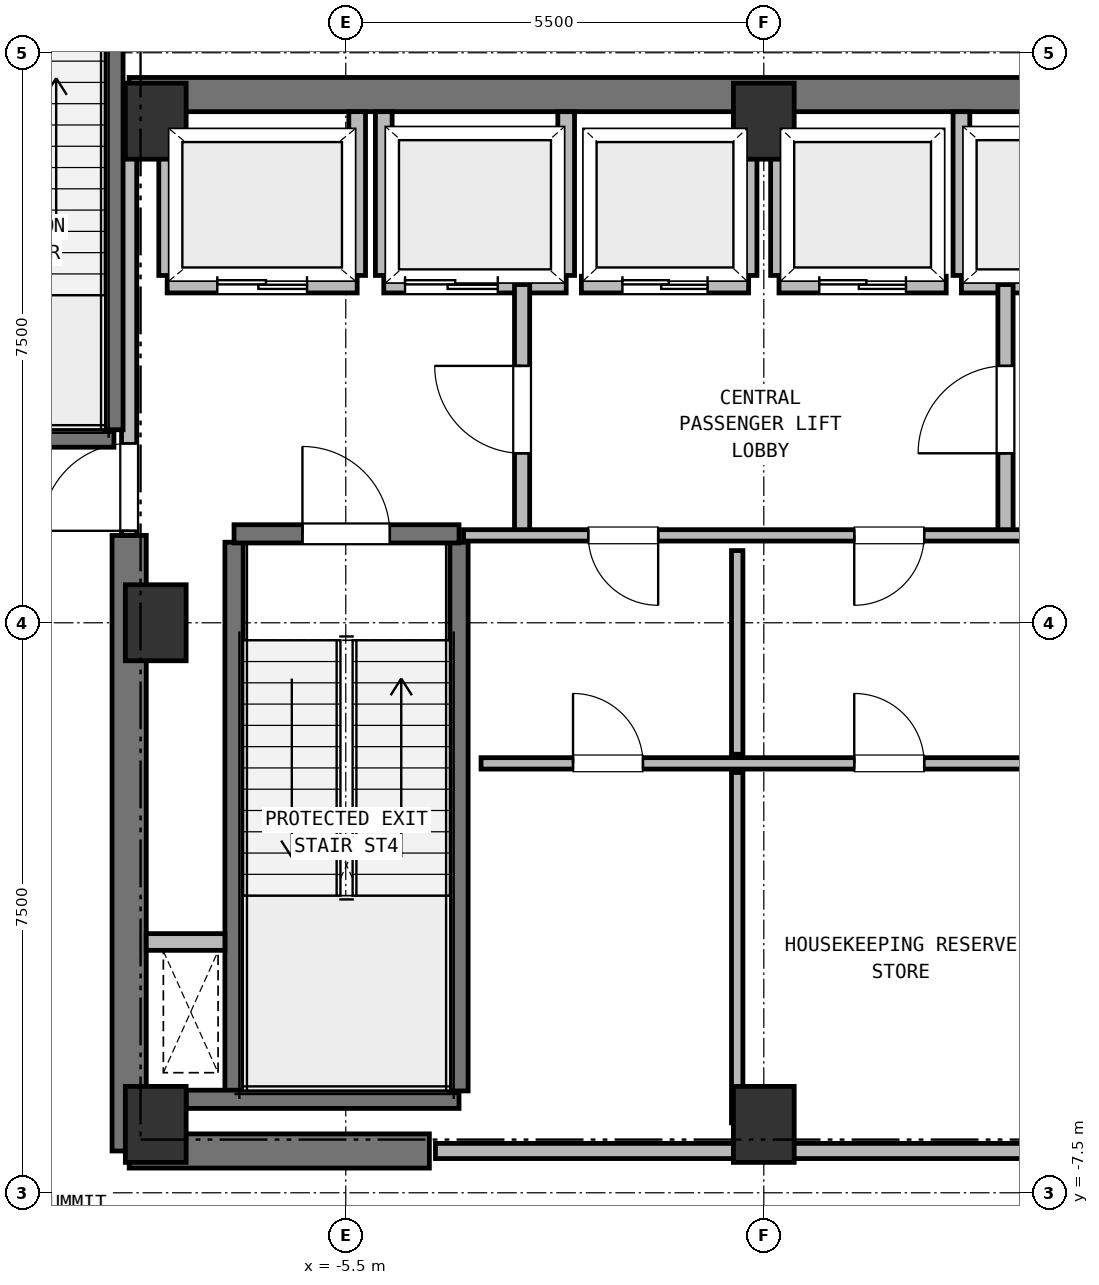
"""IFC4 building model, lengths in metres.
Left out: names, types, materials, properties, quantities, classifications, styles, units other than length and angle.
Written with IfcOpenShell. Run it as: python <this file> out.ifc"""

import sys

from ifc_helpers import new_model, si_unit, direction, frame, frame_2d, origin, origin_2d, place, context, subcontext, project, spatial, rectangle, extrude, element, fill, save


model = new_model("IFC4")
c1 = context("Model", 3, precision=1e-05, world=origin(), true_north=direction((0.0, 1.0)))
c2 = subcontext(c1, "Body", "Model", "MODEL_VIEW")
j1 = project(units=[si_unit("LENGTHUNIT", "METRE"), si_unit("PLANEANGLEUNIT", "RADIAN")], contexts=[c1])
p1 = place(None, origin())
s1 = spatial("IfcSite", under=j1, at=p1, CompositionType="ELEMENT")
p2 = place(p1, origin())
s2 = spatial("IfcBuilding", under=s1, at=p2, CompositionType="ELEMENT")
p3 = place(p2, frame((0.0, 0.0, 286.0)))
s3 = spatial("IfcBuildingStorey", under=s2, at=p3, CompositionType="ELEMENT", Elevation=286.0)
for number, where, z_axis, x_axis in (
    (1, (-8.0, -6.6, 0.0), (0.0, 0.0, 1.0), (1.0, 0.0, 0.0)),
    (2, (0.0, -6.6, 0.0), (0.0, 0.0, 1.0), (1.0, 0.0, 0.0)),
    (3, (0.0, 6.6, 0.0), (0.0, 0.0, 1.0), (1.0, 0.0, 0.0)),
    (4, (-8.0, 6.6, 0.0), (0.0, 0.0, 1.0), (1.0, 0.0, 0.0)),
    (5, (-8.0, 0.0, 0.0), (0.0, 0.0, 1.0), (1.0, 0.0, 0.0)),
):
    element("IfcColumn", number, at=place(p3, frame(where, z_axis=z_axis, x_axis=x_axis)), inside=s3, PredefinedType="COLUMN", context=c2, shape_type="SweptSolid", body=[
        extrude(rectangle(XDim=0.8, YDim=1.0, at=origin_2d()), origin(), (0.0, 0.0, 1.0), 4.4),
    ])
p4 = place(p3, frame((-8.35, 6.95, 0.0), z_axis=(0.0, 0.0, 1.0), x_axis=(1.0, 0.0, 0.0)))
e6 = element("IfcWall", 6, at=p4, inside=s3, PredefinedType="SHEAR", context=c2, shape_type="SweptSolid", body=[
    extrude(rectangle(XDim=16.7, YDim=0.45, at=frame_2d((8.35, 0.0))), origin(), (0.0, 0.0, 1.0), 4.13),
])
p5 = place(p3, frame((-8.35, -6.95, 0.0), z_axis=(0.0, 0.0, 1.0), x_axis=(1.0, 0.0, 0.0)))
e7 = element("IfcWall", 7, at=p5, inside=s3, PredefinedType="SHEAR", context=c2, shape_type="SweptSolid", body=[
    extrude(rectangle(XDim=3.95, YDim=0.45, at=frame_2d((1.975, 0.0))), origin(), (0.0, 0.0, 1.0), 4.13),
])
p6 = place(p3, frame((-8.35, -6.95, 0.0), z_axis=(0.0, 0.0, 1.0), x_axis=(0.0, 1.0, 0.0)))
e8 = element("IfcWall", 8, at=p6, inside=s3, PredefinedType="SHEAR", context=c2, shape_type="SweptSolid", body=[
    extrude(rectangle(XDim=8.1, YDim=0.45, at=frame_2d((4.05, 0.0))), origin(), (0.0, 0.0, 1.0), 4.13),
])
p7 = place(p3, frame((-6.97, -6.16, 0.0), z_axis=(0.0, 0.0, 1.0), x_axis=(0.0, 1.0, 0.0)))
e9 = element("IfcWall", 9, at=p7, inside=s3, PredefinedType="SHEAR", context=c2, shape_type="SweptSolid", body=[
    extrude(rectangle(XDim=7.22, YDim=0.24, at=frame_2d((3.61, 0.0))), origin(), (0.0, 0.0, 1.0), 4.13),
])
p8 = place(p3, frame((-7.6, -6.27, 0.0), z_axis=(0.0, 0.0, 1.0), x_axis=(1.0, 0.0, 0.0)))
e10 = element("IfcWall", 10, at=p8, inside=s3, PredefinedType="SHEAR", context=c2, shape_type="SweptSolid", body=[
    extrude(rectangle(XDim=3.59, YDim=0.24, at=frame_2d((1.795, 0.0))), origin(), (0.0, 0.0, 1.0), 4.13),
])
p9 = place(p3, frame((-4.01, -6.16, 0.0), z_axis=(0.0, 0.0, 1.0), x_axis=(0.0, 1.0, 0.0)))
e11 = element("IfcWall", 11, at=p9, inside=s3, PredefinedType="SHEAR", context=c2, shape_type="SweptSolid", body=[
    extrude(rectangle(XDim=7.22, YDim=0.24, at=frame_2d((3.61, 0.0))), origin(), (0.0, 0.0, 1.0), 4.13),
])
p10 = place(p3, frame((-6.97, 1.17, 0.0), z_axis=(0.0, 0.0, 1.0), x_axis=(1.0, 0.0, 0.0)))
e12 = element("IfcWall", 12, at=p10, inside=s3, PredefinedType="SHEAR", context=c2, shape_type="SweptSolid", body=[
    extrude(rectangle(XDim=2.96, YDim=0.24, at=frame_2d((1.48, 0.0))), origin(), (0.0, 0.0, 1.0), 4.13),
])
p11 = place(p10, frame((0.9, 0.0, 0.0)))
e13 = element("IfcOpeningElement", 13, at=p11, cuts=e12, PredefinedType="OPENING", context=c2, shape_type="SweptSolid", body=[
    extrude(rectangle(XDim=1.15, YDim=2.15, at=frame_2d((0.575, 1.075))), frame((0.0, 0.13, 0.0), z_axis=(0.0, -1.0, 0.0), x_axis=(1.0, 0.0, 0.0)), (0.0, 0.0, 1.0), 0.26),
])
p12 = place(p3, frame((-8.125, -4.2, 0.0), z_axis=(0.0, 0.0, 1.0), x_axis=(1.0, 0.0, 0.0)))
e14 = element("IfcWall", 14, at=p12, inside=s3, PredefinedType="PARTITIONING", context=c2, shape_type="SweptSolid", body=[
    extrude(rectangle(XDim=1.035, YDim=0.22, at=frame_2d((0.518, 0.0))), origin(), (0.0, 0.0, 1.0), 4.13),
])
p13 = place(p3, frame((-7.85, 4.45, 0.0), z_axis=(0.0, 0.0, 1.0), x_axis=(1.0, 0.0, 0.0)))
e15 = element("IfcWall", 15, at=p13, inside=s3, PredefinedType="PARTITIONING", context=c2, shape_type="SweptSolid", body=[
    extrude(rectangle(XDim=2.5, YDim=0.22, at=frame_2d((1.25, 0.0))), origin(), (0.0, 0.0, 1.0), 4.13),
])
p14 = place(p13, frame((0.66, 0.0, 0.0)))
e16 = element("IfcOpeningElement", 16, at=p14, cuts=e15, PredefinedType="OPENING", context=c2, shape_type="SweptSolid", body=[
    extrude(rectangle(XDim=1.18, YDim=2.15, at=frame_2d((0.59, 1.075))), frame((0.0, 0.12, 0.0), z_axis=(0.0, -1.0, 0.0), x_axis=(1.0, 0.0, 0.0)), (0.0, 0.0, 1.0), 0.24),
])
p15 = place(p3, frame((-7.85, 4.57, 0.0), z_axis=(0.0, 0.0, 1.0), x_axis=(0.0, 1.0, 0.0)))
e17 = element("IfcWall", 17, at=p15, inside=s3, PredefinedType="PARTITIONING", context=c2, shape_type="SweptSolid", body=[
    extrude(rectangle(XDim=2.155, YDim=0.22, at=frame_2d((1.078, 0.0))), origin(), (0.0, 0.0, 1.0), 3.81),
])
p16 = place(p3, frame((-5.35, 4.57, 0.0), z_axis=(0.0, 0.0, 1.0), x_axis=(0.0, 1.0, 0.0)))
e18 = element("IfcWall", 18, at=p16, inside=s3, PredefinedType="PARTITIONING", context=c2, shape_type="SweptSolid", body=[
    extrude(rectangle(XDim=2.155, YDim=0.22, at=frame_2d((1.078, 0.0))), origin(), (0.0, 0.0, 1.0), 4.13),
])
p17 = place(p3, frame((-5.0, 4.45, 0.0), z_axis=(0.0, 0.0, 1.0), x_axis=(1.0, 0.0, 0.0)))
e19 = element("IfcWall", 19, at=p17, inside=s3, PredefinedType="PARTITIONING", context=c2, shape_type="SweptSolid", body=[
    extrude(rectangle(XDim=2.4, YDim=0.22, at=frame_2d((1.2, 0.0))), origin(), (0.0, 0.0, 1.0), 4.13),
])
p18 = place(p17, frame((0.28, 0.0, 0.0)))
e20 = element("IfcOpeningElement", 20, at=p18, cuts=e19, PredefinedType="OPENING", context=c2, shape_type="SweptSolid", body=[
    extrude(rectangle(XDim=1.22, YDim=2.15, at=frame_2d((0.61, 1.075))), frame((0.0, 0.12, 0.0), z_axis=(0.0, -1.0, 0.0), x_axis=(1.0, 0.0, 0.0)), (0.0, 0.0, 1.0), 0.24),
])
for number, where, z_axis, x_axis in (
    (21, (-5.0, 4.57, 0.0), (0.0, 0.0, 1.0), (0.0, 1.0, 0.0)),
    (22, (-2.6, 4.57, 0.0), (0.0, 0.0, 1.0), (0.0, 1.0, 0.0)),
):
    element("IfcWall", number, at=place(p3, frame(where, z_axis=z_axis, x_axis=x_axis)), inside=s3, PredefinedType="PARTITIONING", context=c2, shape_type="SweptSolid", body=[
        extrude(rectangle(XDim=2.155, YDim=0.22, at=frame_2d((1.078, 0.0))), origin(), (0.0, 0.0, 1.0), 4.13),
    ])
p19 = place(p3, frame((2.6, 4.45, 0.0), z_axis=(0.0, 0.0, 1.0), x_axis=(1.0, 0.0, 0.0)))
e23 = element("IfcWall", 23, at=p19, inside=s3, PredefinedType="PARTITIONING", context=c2, shape_type="SweptSolid", body=[
    extrude(rectangle(XDim=2.4, YDim=0.22, at=frame_2d((1.2, 0.0))), origin(), (0.0, 0.0, 1.0), 4.13),
])
p20 = place(p19, frame((0.9, 0.0, 0.0)))
e24 = element("IfcOpeningElement", 24, at=p20, cuts=e23, PredefinedType="OPENING", context=c2, shape_type="SweptSolid", body=[
    extrude(rectangle(XDim=1.22, YDim=2.15, at=frame_2d((0.61, 1.075))), frame((0.0, 0.12, 0.0), z_axis=(0.0, -1.0, 0.0), x_axis=(1.0, 0.0, 0.0)), (0.0, 0.0, 1.0), 0.24),
])
p21 = place(p3, frame((2.6, 4.57, 0.0), z_axis=(0.0, 0.0, 1.0), x_axis=(0.0, 1.0, 0.0)))
e25 = element("IfcWall", 25, at=p21, inside=s3, PredefinedType="PARTITIONING", context=c2, shape_type="SweptSolid", body=[
    extrude(rectangle(XDim=2.155, YDim=0.22, at=frame_2d((1.078, 0.0))), origin(), (0.0, 0.0, 1.0), 4.13),
])
p22 = place(p3, frame((-2.4, 4.45, 0.0), z_axis=(0.0, 0.0, 1.0), x_axis=(1.0, 0.0, 0.0)))
e26 = element("IfcWall", 26, at=p22, inside=s3, PredefinedType="PARTITIONING", context=c2, shape_type="SweptSolid", body=[
    extrude(rectangle(XDim=2.2, YDim=0.22, at=frame_2d((1.1, 0.0))), origin(), (0.0, 0.0, 1.0), 4.13),
])
p23 = place(p22, frame((0.54, 0.0, 0.0)))
e27 = element("IfcOpeningElement", 27, at=p23, cuts=e26, PredefinedType="OPENING", context=c2, shape_type="SweptSolid", body=[
    extrude(rectangle(XDim=1.12, YDim=2.15, at=frame_2d((0.56, 1.075))), frame((0.0, 0.12, 0.0), z_axis=(0.0, -1.0, 0.0), x_axis=(1.0, 0.0, 0.0)), (0.0, 0.0, 1.0), 0.24),
])
p24 = place(p3, frame((-0.2, 4.57, 0.0), z_axis=(0.0, 0.0, 1.0), x_axis=(0.0, 1.0, 0.0)))
e28 = element("IfcWall", 28, at=p24, inside=s3, PredefinedType="PARTITIONING", context=c2, shape_type="SweptSolid", body=[
    extrude(rectangle(XDim=2.155, YDim=0.22, at=frame_2d((1.078, 0.0))), origin(), (0.0, 0.0, 1.0), 4.13),
])
p25 = place(p3, frame((0.2, 4.45, 0.0), z_axis=(0.0, 0.0, 1.0), x_axis=(1.0, 0.0, 0.0)))
e29 = element("IfcWall", 29, at=p25, inside=s3, PredefinedType="PARTITIONING", context=c2, shape_type="SweptSolid", body=[
    extrude(rectangle(XDim=2.2, YDim=0.22, at=frame_2d((1.1, 0.0))), origin(), (0.0, 0.0, 1.0), 4.13),
])
p26 = place(p25, frame((0.53, 0.0, 0.0)))
e30 = element("IfcOpeningElement", 30, at=p26, cuts=e29, PredefinedType="OPENING", context=c2, shape_type="SweptSolid", body=[
    extrude(rectangle(XDim=1.14, YDim=2.15, at=frame_2d((0.57, 1.075))), frame((0.0, 0.12, 0.0), z_axis=(0.0, -1.0, 0.0), x_axis=(1.0, 0.0, 0.0)), (0.0, 0.0, 1.0), 0.24),
])
p27 = place(p3, frame((0.2, 4.57, 0.0), z_axis=(0.0, 0.0, 1.0), x_axis=(0.0, 1.0, 0.0)))
e31 = element("IfcWall", 31, at=p27, inside=s3, PredefinedType="PARTITIONING", context=c2, shape_type="SweptSolid", body=[
    extrude(rectangle(XDim=2.155, YDim=0.22, at=frame_2d((1.078, 0.0))), origin(), (0.0, 0.0, 1.0), 4.13),
])
p28 = place(p3, frame((-3.18, 1.15, 0.0), z_axis=(0.0, 0.0, 1.0), x_axis=(0.0, 1.0, 0.0)))
e32 = element("IfcWall", 32, at=p28, inside=s3, PredefinedType="PARTITIONING", context=c2, shape_type="SweptSolid", body=[
    extrude(rectangle(XDim=3.3, YDim=0.2, at=frame_2d((1.65, 0.0))), origin(), (0.0, 0.0, 1.0), 4.13),
])
p29 = place(p28, frame((1.08, 0.0, 0.0)))
e33 = element("IfcOpeningElement", 33, at=p29, cuts=e32, PredefinedType="OPENING", context=c2, shape_type="SweptSolid", body=[
    extrude(rectangle(XDim=1.15, YDim=2.15, at=frame_2d((0.575, 1.075))), frame((0.0, 0.11, 0.0), z_axis=(0.0, -1.0, 0.0), x_axis=(1.0, 0.0, 0.0)), (0.0, 0.0, 1.0), 0.22),
])
p30 = place(p3, frame((3.18, 1.15, 0.0), z_axis=(0.0, 0.0, 1.0), x_axis=(0.0, 1.0, 0.0)))
e34 = element("IfcWall", 34, at=p30, inside=s3, PredefinedType="PARTITIONING", context=c2, shape_type="SweptSolid", body=[
    extrude(rectangle(XDim=3.3, YDim=0.2, at=frame_2d((1.65, 0.0))), origin(), (0.0, 0.0, 1.0), 4.13),
])
p31 = place(p30, frame((1.08, 0.0, 0.0)))
e35 = element("IfcOpeningElement", 35, at=p31, cuts=e34, PredefinedType="OPENING", context=c2, shape_type="SweptSolid", body=[
    extrude(rectangle(XDim=1.15, YDim=2.15, at=frame_2d((0.575, 1.075))), frame((0.0, 0.11, 0.0), z_axis=(0.0, -1.0, 0.0), x_axis=(1.0, 0.0, 0.0)), (0.0, 0.0, 1.0), 0.22),
])
p32 = place(p3, frame((-8.35, 1.15, 0.0), z_axis=(0.0, 0.0, 1.0), x_axis=(0.0, 1.0, 0.0)))
e36 = element("IfcWall", 36, at=p32, inside=s3, PredefinedType="PARTITIONING", context=c2, shape_type="SweptSolid", body=[
    extrude(rectangle(XDim=5.4, YDim=0.2, at=frame_2d((2.7, 0.0))), origin(), (0.0, 0.0, 1.0), 4.13),
])
p33 = place(p32, frame((0.06, 0.0, 0.0)))
e37 = element("IfcOpeningElement", 37, at=p33, cuts=e36, PredefinedType="OPENING", context=c2, shape_type="SweptSolid", body=[
    extrude(rectangle(XDim=1.15, YDim=2.15, at=frame_2d((0.575, 1.075))), frame((0.0, 0.11, 0.0), z_axis=(0.0, -1.0, 0.0), x_axis=(1.0, 0.0, 0.0)), (0.0, 0.0, 1.0), 0.22),
])
p34 = place(p3, frame((3.95, 1.15, 0.0), z_axis=(0.0, 0.0, 1.0), x_axis=(-1.0, 0.0, 0.0)))
e38 = element("IfcWall", 38, at=p34, inside=s3, PredefinedType="PARTITIONING", context=c2, shape_type="SweptSolid", body=[
    extrude(rectangle(XDim=7.9, YDim=0.15, at=frame_2d((3.95, 0.0))), origin(), (0.0, 0.0, 1.0), 4.13),
])
p35 = place(p34, frame((5.34, 0.0, 0.0)))
e39 = element("IfcOpeningElement", 39, at=p35, cuts=e38, PredefinedType="OPENING", context=c2, shape_type="SweptSolid", body=[
    extrude(rectangle(XDim=0.92, YDim=2.05, at=frame_2d((0.46, 1.025))), frame((0.0, 0.085, 0.0), z_axis=(0.0, -1.0, 0.0), x_axis=(1.0, 0.0, 0.0)), (0.0, 0.0, 1.0), 0.17),
])
p36 = place(p34, frame((1.84, 0.0, 0.0)))
e40 = element("IfcOpeningElement", 40, at=p36, cuts=e38, PredefinedType="OPENING", context=c2, shape_type="SweptSolid", body=[
    extrude(rectangle(XDim=0.92, YDim=2.05, at=frame_2d((0.46, 1.025))), frame((0.0, 0.085, 0.0), z_axis=(0.0, -1.0, 0.0), x_axis=(1.0, 0.0, 0.0)), (0.0, 0.0, 1.0), 0.17),
])
p37 = place(p3, frame((-4.32, -6.95, 0.0), z_axis=(0.0, 0.0, 1.0), x_axis=(1.0, 0.0, 0.0)))
e41 = element("IfcWall", 41, at=p37, inside=s3, PredefinedType="PARTITIONING", context=c2, shape_type="SweptSolid", body=[
    extrude(rectangle(XDim=8.64, YDim=0.2, at=frame_2d((4.32, 0.0))), origin(), (0.0, 0.0, 1.0), 4.13),
])
p38 = place(p3, frame((-3.72, -1.85, 0.0), z_axis=(0.0, 0.0, 1.0), x_axis=(1.0, 0.0, 0.0)))
e42 = element("IfcWall", 42, at=p38, inside=s3, PredefinedType="PARTITIONING", context=c2, shape_type="SweptSolid", body=[
    extrude(rectangle(XDim=7.44, YDim=0.15, at=frame_2d((3.72, 0.0))), origin(), (0.0, 0.0, 1.0), 4.13),
])
p39 = place(p38, frame((1.21, 0.0, 0.0)))
e43 = element("IfcOpeningElement", 43, at=p39, cuts=e42, PredefinedType="OPENING", context=c2, shape_type="SweptSolid", body=[
    extrude(rectangle(XDim=0.92, YDim=2.05, at=frame_2d((0.46, 1.025))), frame((0.0, 0.085, 0.0), z_axis=(0.0, -1.0, 0.0), x_axis=(1.0, 0.0, 0.0)), (0.0, 0.0, 1.0), 0.17),
])
p40 = place(p38, frame((4.91, 0.0, 0.0)))
e44 = element("IfcOpeningElement", 44, at=p40, cuts=e42, PredefinedType="OPENING", context=c2, shape_type="SweptSolid", body=[
    extrude(rectangle(XDim=0.92, YDim=2.05, at=frame_2d((0.46, 1.025))), frame((0.0, 0.085, 0.0), z_axis=(0.0, -1.0, 0.0), x_axis=(1.0, 0.0, 0.0)), (0.0, 0.0, 1.0), 0.17),
])
p41 = place(p3, frame((-0.35, -6.58, 0.0), z_axis=(0.0, 0.0, 1.0), x_axis=(0.0, 1.0, 0.0)))
e45 = element("IfcWall", 45, at=p41, inside=s3, PredefinedType="PARTITIONING", context=c2, shape_type="SweptSolid", body=[
    extrude(rectangle(XDim=4.61, YDim=0.15, at=frame_2d((2.305, 0.0))), origin(), (0.0, 0.0, 1.0), 4.13),
])
p42 = place(p3, frame((-0.35, -1.73, 0.0), z_axis=(0.0, 0.0, 1.0), x_axis=(0.0, 1.0, 0.0)))
e46 = element("IfcWall", 46, at=p42, inside=s3, PredefinedType="PARTITIONING", context=c2, shape_type="SweptSolid", body=[
    extrude(rectangle(XDim=2.68, YDim=0.15, at=frame_2d((1.34, 0.0))), origin(), (0.0, 0.0, 1.0), 4.13),
])
p43 = place(p3, frame((-11.51, 2.43, 0.0), z_axis=(0.0, 0.0, 1.0), x_axis=(1.0, 0.0, 0.0)))
e47 = element("IfcWall", 47, at=p43, inside=s3, PredefinedType="SHEAR", context=c2, shape_type="SweptSolid", body=[
    extrude(rectangle(XDim=2.96, YDim=0.24, at=frame_2d((1.48, 0.0))), origin(), (0.0, 0.0, 1.0), 4.13),
])
p44 = place(p3, frame((-8.55, 2.54, 0.0), z_axis=(0.0, 0.0, 1.0), x_axis=(0.0, 1.0, 0.0)))
e48 = element("IfcWall", 48, at=p44, inside=s3, PredefinedType="SHEAR", context=c2, shape_type="SweptSolid", body=[
    extrude(rectangle(XDim=6.42, YDim=0.24, at=frame_2d((3.21, 0.0))), origin(), (0.0, 0.0, 1.0), 4.13),
])
p45 = place(p11, origin())
e49 = element("IfcDoor", 49, at=p45, inside=s3, OperationType="SINGLE_SWING_LEFT", PredefinedType="DOOR", context=c2, shape_type="SweptSolid", body=[
    extrude(rectangle(XDim=1.15, YDim=2.15, at=frame_2d((0.575, 1.075))), frame((0.0, 0.025, 0.0), z_axis=(0.0, -1.0, 0.0), x_axis=(1.0, 0.0, 0.0)), (0.0, 0.0, 1.0), 0.05),
])
fill(e13, e49)
p46 = place(p14, origin())
e50 = element("IfcDoor", 50, at=p46, inside=s3, OperationType="DOUBLE_DOOR_SLIDING", PredefinedType="DOOR", context=c2, shape_type="SweptSolid", body=[
    extrude(rectangle(XDim=1.18, YDim=2.15, at=frame_2d((0.59, 1.075))), frame((0.0, 0.025, 0.0), z_axis=(0.0, -1.0, 0.0), x_axis=(1.0, 0.0, 0.0)), (0.0, 0.0, 1.0), 0.05),
])
fill(e16, e50)
p47 = place(p18, origin())
e51 = element("IfcDoor", 51, at=p47, inside=s3, OperationType="DOUBLE_DOOR_SLIDING", PredefinedType="DOOR", context=c2, shape_type="SweptSolid", body=[
    extrude(rectangle(XDim=1.22, YDim=2.15, at=frame_2d((0.61, 1.075))), frame((0.0, 0.025, 0.0), z_axis=(0.0, -1.0, 0.0), x_axis=(1.0, 0.0, 0.0)), (0.0, 0.0, 1.0), 0.05),
])
fill(e20, e51)
p48 = place(p23, origin())
e52 = element("IfcDoor", 52, at=p48, inside=s3, OperationType="DOUBLE_DOOR_SLIDING", PredefinedType="DOOR", context=c2, shape_type="SweptSolid", body=[
    extrude(rectangle(XDim=1.12, YDim=2.15, at=frame_2d((0.56, 1.075))), frame((0.0, 0.025, 0.0), z_axis=(0.0, -1.0, 0.0), x_axis=(1.0, 0.0, 0.0)), (0.0, 0.0, 1.0), 0.05),
])
fill(e27, e52)
p49 = place(p26, origin())
e53 = element("IfcDoor", 53, at=p49, inside=s3, OperationType="DOUBLE_DOOR_SLIDING", PredefinedType="DOOR", context=c2, shape_type="SweptSolid", body=[
    extrude(rectangle(XDim=1.14, YDim=2.15, at=frame_2d((0.57, 1.075))), frame((0.0, 0.025, 0.0), z_axis=(0.0, -1.0, 0.0), x_axis=(1.0, 0.0, 0.0)), (0.0, 0.0, 1.0), 0.05),
])
fill(e30, e53)
p50 = place(p29, origin())
e54 = element("IfcDoor", 54, at=p50, inside=s3, OperationType="SINGLE_SWING_RIGHT", PredefinedType="DOOR", context=c2, shape_type="SweptSolid", body=[
    extrude(rectangle(XDim=1.15, YDim=2.15, at=frame_2d((0.575, 1.075))), frame((0.0, 0.025, 0.0), z_axis=(0.0, -1.0, 0.0), x_axis=(1.0, 0.0, 0.0)), (0.0, 0.0, 1.0), 0.05),
])
fill(e33, e54)
p51 = place(p31, origin())
e55 = element("IfcDoor", 55, at=p51, inside=s3, OperationType="SINGLE_SWING_LEFT", PredefinedType="DOOR", context=c2, shape_type="SweptSolid", body=[
    extrude(rectangle(XDim=1.15, YDim=2.15, at=frame_2d((0.575, 1.075))), frame((0.0, 0.025, 0.0), z_axis=(0.0, -1.0, 0.0), x_axis=(1.0, 0.0, 0.0)), (0.0, 0.0, 1.0), 0.05),
])
fill(e35, e55)
p52 = place(p33, origin())
e56 = element("IfcDoor", 56, at=p52, inside=s3, OperationType="SINGLE_SWING_LEFT", PredefinedType="DOOR", context=c2, shape_type="SweptSolid", body=[
    extrude(rectangle(XDim=1.15, YDim=2.15, at=frame_2d((0.575, 1.075))), frame((0.0, 0.025, 0.0), z_axis=(0.0, -1.0, 0.0), x_axis=(1.0, 0.0, 0.0)), (0.0, 0.0, 1.0), 0.05),
])
fill(e37, e56)
p53 = place(p35, origin())
e57 = element("IfcDoor", 57, at=p53, inside=s3, OperationType="SINGLE_SWING_LEFT", PredefinedType="DOOR", context=c2, shape_type="SweptSolid", body=[
    extrude(rectangle(XDim=0.92, YDim=2.05, at=frame_2d((0.46, 1.025))), frame((0.0, 0.025, 0.0), z_axis=(0.0, -1.0, 0.0), x_axis=(1.0, 0.0, 0.0)), (0.0, 0.0, 1.0), 0.05),
])
fill(e39, e57)
p54 = place(p36, origin())
e58 = element("IfcDoor", 58, at=p54, inside=s3, OperationType="SINGLE_SWING_RIGHT", PredefinedType="DOOR", context=c2, shape_type="SweptSolid", body=[
    extrude(rectangle(XDim=0.92, YDim=2.05, at=frame_2d((0.46, 1.025))), frame((0.0, 0.025, 0.0), z_axis=(0.0, -1.0, 0.0), x_axis=(1.0, 0.0, 0.0)), (0.0, 0.0, 1.0), 0.05),
])
fill(e40, e58)
p55 = place(p39, origin())
e59 = element("IfcDoor", 59, at=p55, inside=s3, OperationType="SINGLE_SWING_LEFT", PredefinedType="DOOR", context=c2, shape_type="SweptSolid", body=[
    extrude(rectangle(XDim=0.92, YDim=2.05, at=frame_2d((0.46, 1.025))), frame((0.0, 0.025, 0.0), z_axis=(0.0, -1.0, 0.0), x_axis=(1.0, 0.0, 0.0)), (0.0, 0.0, 1.0), 0.05),
])
fill(e43, e59)
p56 = place(p40, origin())
e60 = element("IfcDoor", 60, at=p56, inside=s3, OperationType="SINGLE_SWING_LEFT", PredefinedType="DOOR", context=c2, shape_type="SweptSolid", body=[
    extrude(rectangle(XDim=0.92, YDim=2.05, at=frame_2d((0.46, 1.025))), frame((0.0, 0.025, 0.0), z_axis=(0.0, -1.0, 0.0), x_axis=(1.0, 0.0, 0.0)), (0.0, 0.0, 1.0), 0.05),
])
fill(e44, e60)
save(model, sys.argv[1])
